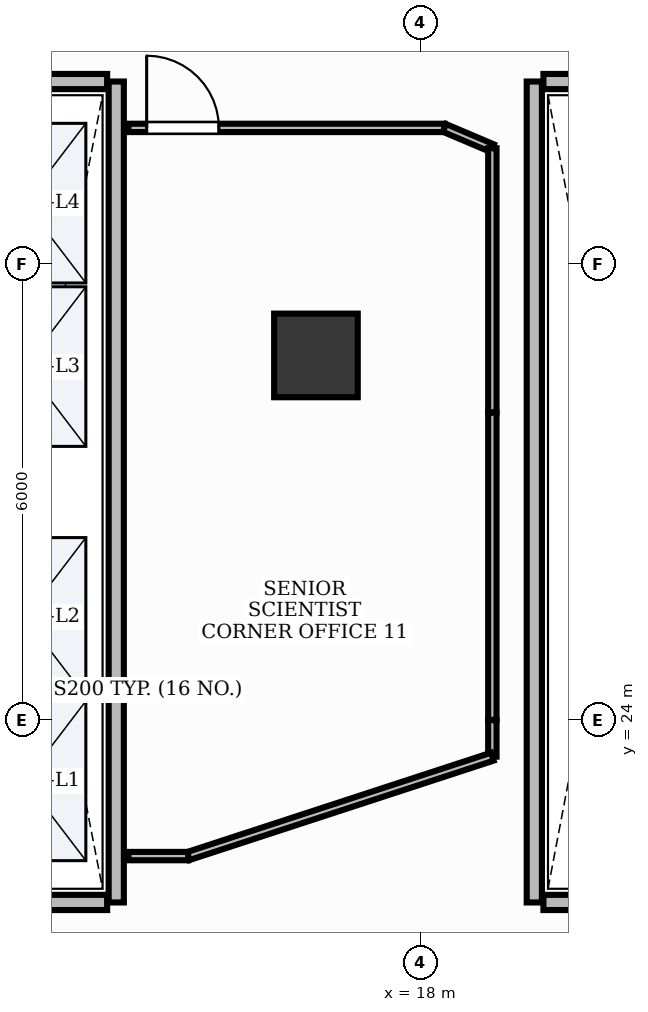
"""IFC4 building model, lengths in metres.
Left out: names, types, materials, properties, quantities, classifications, styles, units other than length and angle.
Written with IfcOpenShell. Run it as: python <this file> out.ifc"""

import sys

from ifc_helpers import new_model, si_unit, direction, frame, frame_2d, origin, origin_2d, place, context, subcontext, project, spatial, rectangle, extrude, element, fill, save


model = new_model("IFC4")
c1 = context("Model", 3, precision=1e-05, world=origin(), true_north=direction((0.0, 1.0)))
c2 = subcontext(c1, "Body", "Model", "MODEL_VIEW")
j1 = project(units=[si_unit("LENGTHUNIT", "METRE"), si_unit("PLANEANGLEUNIT", "RADIAN")], contexts=[c1])
p1 = place(None, origin())
s1 = spatial("IfcSite", under=j1, at=p1, CompositionType="ELEMENT")
p2 = place(p1, origin())
s2 = spatial("IfcBuilding", under=s1, at=p2, CompositionType="ELEMENT")
p3 = place(p2, frame((0.0, 0.0, 94.2)))
s3 = spatial("IfcBuildingStorey", under=s2, at=p3, CompositionType="ELEMENT", Elevation=94.2)
p4 = place(p3, frame((16.627, 28.797, -0.0), z_axis=(0.0, 0.0, 1.0), x_axis=(1.0, 0.0, 0.0)))
e1 = element("IfcColumn", 1, at=p4, inside=s3, PredefinedType="COLUMN", context=c2, shape_type="SweptSolid", body=[
    extrude(rectangle(XDim=1.1, YDim=1.1, at=origin_2d()), origin(), (0.0, 0.0, 1.0), 3.901),
])
p5 = place(p3, frame((14.0, 21.6, 0.0), z_axis=(0.0, 0.0, 1.0), x_axis=(0.0, 1.0, 0.0)))
e2 = element("IfcWall", 2, at=p5, inside=s3, PredefinedType="PARTITIONING", context=c2, shape_type="SweptSolid", body=[
    extrude(rectangle(XDim=10.8, YDim=0.2, at=frame_2d((5.4, 0.0))), origin(), (0.0, 0.0, 1.0), 2.91),
])
for number, where, z_axis, x_axis in (
    (3, (11.72, 21.6, 0.0), (0.0, 0.0, 1.0), (1.0, 0.0, 0.0)),
    (4, (11.72, 32.4, 0.0), (0.0, 0.0, 1.0), (1.0, 0.0, 0.0)),
):
    element("IfcWall", number, at=place(p3, frame(where, z_axis=z_axis, x_axis=x_axis)), inside=s3, PredefinedType="PARTITIONING", context=c2, shape_type="SweptSolid", body=[
        extrude(rectangle(XDim=2.16, YDim=0.2, at=frame_2d((1.08, 0.0))), origin(), (0.0, 0.0, 1.0), 2.91),
    ])
p6 = place(p3, frame((19.5, 21.6, 0.0), z_axis=(0.0, 0.0, 1.0), x_axis=(0.0, 1.0, 0.0)))
e5 = element("IfcWall", 5, at=p6, inside=s3, PredefinedType="PARTITIONING", context=c2, shape_type="SweptSolid", body=[
    extrude(rectangle(XDim=10.8, YDim=0.2, at=frame_2d((5.4, 0.0))), origin(), (0.0, 0.0, 1.0), 2.91),
])
for number, where, z_axis, x_axis in (
    (6, (19.62, 21.6, 0.0), (0.0, 0.0, 1.0), (1.0, 0.0, 0.0)),
    (7, (19.62, 32.4, 0.0), (0.0, 0.0, 1.0), (1.0, 0.0, 0.0)),
):
    element("IfcWall", number, at=place(p3, frame(where, z_axis=z_axis, x_axis=x_axis)), inside=s3, PredefinedType="PARTITIONING", context=c2, shape_type="SweptSolid", body=[
        extrude(rectangle(XDim=2.11, YDim=0.2, at=frame_2d((1.055, 0.0))), origin(), (0.0, 0.0, 1.0), 2.91),
    ])
p7 = place(p3, frame((14.16, 31.79, 0.0), z_axis=(0.0, 0.0, 1.0), x_axis=(1.0, 0.0, 0.0)))
e8 = element("IfcWall", 8, at=p7, inside=s3, PredefinedType="MOVABLE", context=c2, shape_type="SweptSolid", body=[
    extrude(rectangle(XDim=4.158, YDim=0.11, at=frame_2d((2.079, 0.0))), origin(), (0.0, 0.0, 1.0), 2.91),
])
p8 = place(p7, frame((0.24, 0.0, 0.0)))
e9 = element("IfcOpeningElement", 9, at=p8, cuts=e8, PredefinedType="OPENING", context=c2, shape_type="SweptSolid", body=[
    extrude(rectangle(XDim=0.95, YDim=2.15, at=frame_2d((0.475, 1.075))), frame((0.0, 0.07, 0.0), z_axis=(0.0, -1.0, 0.0), x_axis=(1.0, 0.0, 0.0)), (0.0, 0.0, 1.0), 0.14),
])
p9 = place(p3, frame((18.318, 31.79, 0.0), z_axis=(0.0, 0.0, 1.0), x_axis=(0.920523463189, -0.390687283795, 0.0)))
e10 = element("IfcWall", 10, at=p9, inside=s3, PredefinedType="MOVABLE", context=c2, shape_type="SweptSolid", body=[
    extrude(rectangle(XDim=0.684, YDim=0.11, at=frame_2d((0.342, 0.0))), origin(), (0.0, 0.0, 1.0), 2.91),
])
p10 = place(p3, frame((18.948, 31.522, 0.0), z_axis=(0.0, 0.0, 1.0), x_axis=(0.0, -1.0, 0.0)))
e11 = element("IfcWall", 11, at=p10, inside=s3, PredefinedType="MOVABLE", context=c2, shape_type="SweptSolid", body=[
    extrude(rectangle(XDim=3.475, YDim=0.11, at=frame_2d((1.738, 0.0))), origin(), (0.0, 0.0, 1.0), 2.91),
])
p11 = place(p3, frame((18.948, 28.043, 0.0), z_axis=(0.0, 0.0, 1.0), x_axis=(0.0, -1.0, 0.0)))
e12 = element("IfcWall", 12, at=p11, inside=s3, PredefinedType="MOVABLE", context=c2, shape_type="SweptSolid", body=[
    extrude(rectangle(XDim=4.041, YDim=0.11, at=frame_2d((2.021, 0.0))), origin(), (0.0, 0.0, 1.0), 2.91),
])
p12 = place(p3, frame((18.948, 23.998, 0.0), z_axis=(0.0, 0.0, 1.0), x_axis=(0.0, -1.0, 0.0)))
e13 = element("IfcWall", 13, at=p12, inside=s3, PredefinedType="MOVABLE", context=c2, shape_type="SweptSolid", body=[
    extrude(rectangle(XDim=0.48, YDim=0.11, at=frame_2d((0.24, 0.0))), origin(), (0.0, 0.0, 1.0), 2.91),
])
p13 = place(p3, frame((18.948, 23.518, 0.0), z_axis=(0.0, 0.0, 1.0), x_axis=(-0.950522660163, -0.31065523095, 0.0)))
e14 = element("IfcWall", 14, at=p13, inside=s3, PredefinedType="MOVABLE", context=c2, shape_type="SweptSolid", body=[
    extrude(rectangle(XDim=4.21, YDim=0.11, at=frame_2d((2.105, 0.0))), origin(), (0.0, 0.0, 1.0), 2.91),
])
p14 = place(p3, frame((14.946, 22.21, 0.0), z_axis=(0.0, 0.0, 1.0), x_axis=(-1.0, 0.0, 0.0)))
e15 = element("IfcWall", 15, at=p14, inside=s3, PredefinedType="MOVABLE", context=c2, shape_type="SweptSolid", body=[
    extrude(rectangle(XDim=0.786, YDim=0.11, at=frame_2d((0.393, 0.0))), origin(), (0.0, 0.0, 1.0), 2.91),
])
p15 = place(p8, origin())
e16 = element("IfcDoor", 16, at=p15, inside=s3, OperationType="SINGLE_SWING_LEFT", PredefinedType="DOOR", context=c2, shape_type="SweptSolid", body=[
    extrude(rectangle(XDim=0.95, YDim=2.15, at=frame_2d((0.475, 1.075))), frame((0.0, 0.025, 0.0), z_axis=(0.0, -1.0, 0.0), x_axis=(1.0, 0.0, 0.0)), (0.0, 0.0, 1.0), 0.05),
])
fill(e9, e16)
save(model, sys.argv[1])
